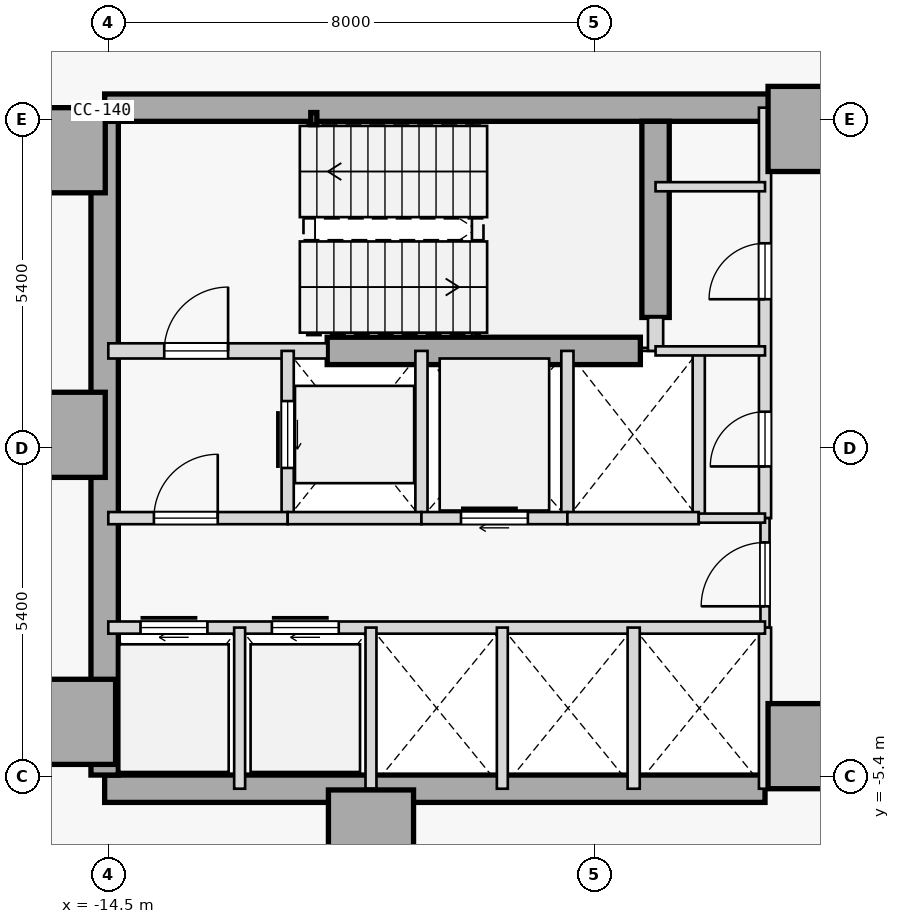
"""IFC4 building model, lengths in metres.
Left out: names, types, materials, properties, quantities, classifications, styles, units other than length and angle.
Written with IfcOpenShell. Run it as: python <this file> out.ifc"""

import sys

from ifc_helpers import new_model, si_unit, direction, frame, frame_2d, origin, origin_2d, place, context, subcontext, project, spatial, rectangle, hollow_rectangle, extrude, element, fill, save


model = new_model("IFC4")
c1 = context("Model", 3, precision=1e-05, world=origin(), true_north=direction((0.0, 1.0)))
c2 = subcontext(c1, "Body", "Model", "MODEL_VIEW")
j1 = project(units=[si_unit("LENGTHUNIT", "METRE"), si_unit("PLANEANGLEUNIT", "RADIAN")], contexts=[c1])
p1 = place(None, origin())
s1 = spatial("IfcSite", under=j1, at=p1, CompositionType="ELEMENT")
p2 = place(p1, origin())
s2 = spatial("IfcBuilding", under=s1, at=p2, CompositionType="ELEMENT")
p3 = place(p2, frame((0.0, 0.0, 75.0)))
s3 = spatial("IfcBuildingStorey", under=s2, at=p3, CompositionType="ELEMENT", Elevation=75.0)
for number, where, z_axis, x_axis in (
    (1, (-15.25, 4.9, 0.0), (0.0, 0.0, 1.0), (1.0, 0.0, 0.0)),
    (2, (-15.25, 0.22, 0.0), (0.0, 0.0, 1.0), (1.0, 0.0, 0.0)),
    (3, (-15.08, -4.5, 0.0), (0.0, 0.0, 1.0), (1.0, 0.0, 0.0)),
    (4, (-10.18, -6.32, 0.0), (0.0, 0.0, 1.0), (1.0, 0.0, 0.0)),
    (5, (-2.95, -4.9, 0.0), (0.0, 0.0, 1.0), (1.0, 0.0, 0.0)),
    (6, (-2.95, 5.25, 0.0), (0.0, 0.0, 1.0), (1.0, 0.0, 0.0)),
):
    element("IfcColumn", number, at=place(p3, frame(where, z_axis=z_axis, x_axis=x_axis)), inside=s3, PredefinedType="COLUMN", context=c2, shape_type="SweptSolid", body=[
        extrude(rectangle(XDim=1.4, YDim=1.4, at=origin_2d()), origin(), (0.0, 0.0, 1.0), 3.8),
    ])
p4 = place(p3, frame((-14.56, 5.6, 0.0), z_axis=(0.0, 0.0, 1.0), x_axis=(1.0, 0.0, 0.0)))
e7 = element("IfcWall", 7, at=p4, inside=s3, PredefinedType="SHEAR", context=c2, shape_type="SweptSolid", body=[
    extrude(rectangle(XDim=11.41, YDim=0.45, at=frame_2d((5.705, 0.0))), origin(), (0.0, 0.0, 1.0), 3.4),
])
p5 = place(p3, frame((-14.56, -5.6, 0.0), z_axis=(0.0, 0.0, 1.0), x_axis=(1.0, 0.0, 0.0)))
e8 = element("IfcWall", 8, at=p5, inside=s3, PredefinedType="SHEAR", context=c2, shape_type="SweptSolid", body=[
    extrude(rectangle(XDim=10.86, YDim=0.45, at=frame_2d((5.43, 0.0))), origin(), (0.0, 0.0, 1.0), 3.4),
])
p6 = place(p3, frame((-14.56, -5.375, 0.0), z_axis=(0.0, 0.0, 1.0), x_axis=(0.0, 1.0, 0.0)))
e9 = element("IfcWall", 9, at=p6, inside=s3, PredefinedType="SHEAR", context=c2, shape_type="SweptSolid", body=[
    extrude(rectangle(XDim=10.75, YDim=0.45, at=frame_2d((5.375, 0.0))), origin(), (0.0, 0.0, 1.0), 3.4),
])
p7 = place(p3, frame((-5.5, 2.15, 0.0), z_axis=(0.0, 0.0, 1.0), x_axis=(0.0, 1.0, 0.0)))
e10 = element("IfcWall", 10, at=p7, inside=s3, PredefinedType="SHEAR", context=c2, shape_type="SweptSolid", body=[
    extrude(rectangle(XDim=3.225, YDim=0.45, at=frame_2d((1.613, 0.0))), origin(), (0.0, 0.0, 1.0), 3.4),
])
p8 = place(p3, frame((-10.9, 1.6, 0.0), z_axis=(0.0, 0.0, 1.0), x_axis=(1.0, 0.0, 0.0)))
e11 = element("IfcWall", 11, at=p8, inside=s3, PredefinedType="SHEAR", context=c2, shape_type="SweptSolid", body=[
    extrude(rectangle(XDim=5.15, YDim=0.45, at=frame_2d((2.575, 0.0))), origin(), (0.0, 0.0, 1.0), 3.4),
])
p9 = place(p3, frame((-11.12, 5.42, 0.0), z_axis=(0.0, 0.0, 1.0), x_axis=(1.0, 0.0, 0.0)))
e12 = element("IfcColumn", 12, at=p9, inside=s3, PredefinedType="COLUMN", context=c2, shape_type="SweptSolid", body=[
    extrude(hollow_rectangle(XDim=0.1, YDim=0.2, WallThickness=0.008, at=origin_2d()), origin(), (0.0, 0.0, 1.0), 3.8),
])
p10 = place(p3, frame((-14.5, 1.6, 0.0), z_axis=(0.0, 0.0, 1.0), x_axis=(1.0, 0.0, 0.0)))
e13 = element("IfcWall", 13, at=p10, inside=s3, PredefinedType="STANDARD", context=c2, shape_type="SweptSolid", body=[
    extrude(rectangle(XDim=3.6, YDim=0.25, at=frame_2d((1.8, 0.0))), origin(), (0.0, 0.0, 1.0), 3.4),
])
p11 = place(p10, frame((0.92, 0.0, 0.0)))
e14 = element("IfcOpeningElement", 14, at=p11, cuts=e13, PredefinedType="OPENING", context=c2, shape_type="SweptSolid", body=[
    extrude(rectangle(XDim=1.05, YDim=2.15, at=frame_2d((0.525, 1.075))), frame((0.0, 0.135, 0.0), z_axis=(0.0, -1.0, 0.0), x_axis=(1.0, 0.0, 0.0)), (0.0, 0.0, 1.0), 0.27),
])
p12 = place(p3, frame((-5.5, 1.6, 0.0), z_axis=(0.0, 0.0, 1.0), x_axis=(0.0, 1.0, 0.0)))
e15 = element("IfcWall", 15, at=p12, inside=s3, PredefinedType="STANDARD", context=c2, shape_type="SweptSolid", body=[
    extrude(rectangle(XDim=0.55, YDim=0.25, at=frame_2d((0.275, 0.0))), origin(), (0.0, 0.0, 1.0), 3.4),
])
p13 = place(p3, frame((-3.7, -1.15, 0.0), z_axis=(0.0, 0.0, 1.0), x_axis=(0.0, 1.0, 0.0)))
e16 = element("IfcWall", 16, at=p13, inside=s3, PredefinedType="STANDARD", context=c2, shape_type="SweptSolid", body=[
    extrude(rectangle(XDim=6.75, YDim=0.2, at=frame_2d((3.375, 0.0))), origin(), (0.0, 0.0, 1.0), 3.4),
])
p14 = place(p13, frame((3.6, 0.0, 0.0)))
e17 = element("IfcOpeningElement", 17, at=p14, cuts=e16, PredefinedType="OPENING", context=c2, shape_type="SweptSolid", body=[
    extrude(rectangle(XDim=0.92, YDim=2.15, at=frame_2d((0.46, 1.075))), frame((0.0, 0.11, 0.0), z_axis=(0.0, -1.0, 0.0), x_axis=(1.0, 0.0, 0.0)), (0.0, 0.0, 1.0), 0.22),
])
p15 = place(p13, frame((0.85, 0.0, 0.0)))
e18 = element("IfcOpeningElement", 18, at=p15, cuts=e16, PredefinedType="OPENING", context=c2, shape_type="SweptSolid", body=[
    extrude(rectangle(XDim=0.9, YDim=2.15, at=frame_2d((0.45, 1.075))), frame((0.0, 0.11, 0.0), z_axis=(0.0, -1.0, 0.0), x_axis=(1.0, 0.0, 0.0)), (0.0, 0.0, 1.0), 0.22),
])
p16 = place(p3, frame((-3.7, -2.95, 0.0), z_axis=(0.0, 0.0, 1.0), x_axis=(0.0, 1.0, 0.0)))
e19 = element("IfcWall", 19, at=p16, inside=s3, PredefinedType="PARTITIONING", context=c2, shape_type="SweptSolid", body=[
    extrude(rectangle(XDim=1.8, YDim=0.15, at=frame_2d((0.9, 0.0))), origin(), (0.0, 0.0, 1.0), 3.4),
])
p17 = place(p16, frame((0.35, 0.0, 0.0)))
e20 = element("IfcOpeningElement", 20, at=p17, cuts=e19, PredefinedType="OPENING", context=c2, shape_type="SweptSolid", body=[
    extrude(rectangle(XDim=1.05, YDim=2.18, at=frame_2d((0.525, 1.09))), frame((0.0, 0.085, 0.0), z_axis=(0.0, -1.0, 0.0), x_axis=(1.0, 0.0, 0.0)), (0.0, 0.0, 1.0), 0.17),
])
p18 = place(p3, frame((-3.7, -5.6, 0.0), z_axis=(0.0, 0.0, 1.0), x_axis=(0.0, 1.0, 0.0)))
e21 = element("IfcWall", 21, at=p18, inside=s3, PredefinedType="STANDARD", context=c2, shape_type="SweptSolid", body=[
    extrude(rectangle(XDim=2.65, YDim=0.2, at=frame_2d((1.325, 0.0))), origin(), (0.0, 0.0, 1.0), 3.4),
])
p19 = place(p3, frame((-11.55, -1.15, 0.0), z_axis=(0.0, 0.0, 1.0), x_axis=(0.0, 1.0, 0.0)))
e22 = element("IfcWall", 22, at=p19, inside=s3, PredefinedType="STANDARD", context=c2, shape_type="SweptSolid", body=[
    extrude(rectangle(XDim=2.75, YDim=0.2, at=frame_2d((1.375, 0.0))), origin(), (0.0, 0.0, 1.0), 3.4),
])
p20 = place(p19, frame((0.825, 0.0, 0.0)))
e23 = element("IfcOpeningElement", 23, at=p20, cuts=e22, PredefinedType="OPENING", context=c2, shape_type="SweptSolid", body=[
    extrude(rectangle(XDim=1.1, YDim=2.15, at=frame_2d((0.55, 1.075))), frame((0.0, 0.11, 0.0), z_axis=(0.0, -1.0, 0.0), x_axis=(1.0, 0.0, 0.0)), (0.0, 0.0, 1.0), 0.22),
])
p21 = place(p3, frame((-9.35, -1.15, 0.0), z_axis=(0.0, 0.0, 1.0), x_axis=(0.0, 1.0, 0.0)))
e24 = element("IfcWall", 24, at=p21, inside=s3, PredefinedType="STANDARD", context=c2, shape_type="SweptSolid", body=[
    extrude(rectangle(XDim=2.75, YDim=0.2, at=frame_2d((1.375, 0.0))), origin(), (0.0, 0.0, 1.0), 3.4),
])
p22 = place(p3, frame((-14.5, -1.15, 0.0), z_axis=(0.0, 0.0, 1.0), x_axis=(1.0, 0.0, 0.0)))
e25 = element("IfcWall", 25, at=p22, inside=s3, PredefinedType="STANDARD", context=c2, shape_type="SweptSolid", body=[
    extrude(rectangle(XDim=2.95, YDim=0.2, at=frame_2d((1.475, 0.0))), origin(), (0.0, 0.0, 1.0), 3.4),
])
p23 = place(p22, frame((0.75, 0.0, 0.0)))
e26 = element("IfcOpeningElement", 26, at=p23, cuts=e25, PredefinedType="OPENING", context=c2, shape_type="SweptSolid", body=[
    extrude(rectangle(XDim=1.05, YDim=2.18, at=frame_2d((0.525, 1.09))), frame((0.0, 0.11, 0.0), z_axis=(0.0, -1.0, 0.0), x_axis=(1.0, 0.0, 0.0)), (0.0, 0.0, 1.0), 0.22),
])
p24 = place(p3, frame((-11.55, -1.15, 0.0), z_axis=(0.0, 0.0, 1.0), x_axis=(1.0, 0.0, 0.0)))
e27 = element("IfcWall", 27, at=p24, inside=s3, PredefinedType="STANDARD", context=c2, shape_type="SweptSolid", body=[
    extrude(rectangle(XDim=2.2, YDim=0.2, at=frame_2d((1.1, 0.0))), origin(), (0.0, 0.0, 1.0), 3.4),
])
p25 = place(p3, frame((-6.95, -1.15, 0.0), z_axis=(0.0, 0.0, 1.0), x_axis=(0.0, 1.0, 0.0)))
e28 = element("IfcWall", 28, at=p25, inside=s3, PredefinedType="STANDARD", context=c2, shape_type="SweptSolid", body=[
    extrude(rectangle(XDim=2.75, YDim=0.2, at=frame_2d((1.375, 0.0))), origin(), (0.0, 0.0, 1.0), 3.4),
])
p26 = place(p3, frame((-9.35, -1.15, 0.0), z_axis=(0.0, 0.0, 1.0), x_axis=(1.0, 0.0, 0.0)))
e29 = element("IfcWall", 29, at=p26, inside=s3, PredefinedType="STANDARD", context=c2, shape_type="SweptSolid", body=[
    extrude(rectangle(XDim=2.4, YDim=0.2, at=frame_2d((1.2, 0.0))), origin(), (0.0, 0.0, 1.0), 3.4),
])
p27 = place(p26, frame((0.65, 0.0, 0.0)))
e30 = element("IfcOpeningElement", 30, at=p27, cuts=e29, PredefinedType="OPENING", context=c2, shape_type="SweptSolid", body=[
    extrude(rectangle(XDim=1.1, YDim=2.15, at=frame_2d((0.55, 1.075))), frame((0.0, 0.11, 0.0), z_axis=(0.0, -1.0, 0.0), x_axis=(1.0, 0.0, 0.0)), (0.0, 0.0, 1.0), 0.22),
])
p28 = place(p3, frame((-4.79, -1.15, 0.0), z_axis=(0.0, 0.0, 1.0), x_axis=(0.0, 1.0, 0.0)))
e31 = element("IfcWall", 31, at=p28, inside=s3, PredefinedType="STANDARD", context=c2, shape_type="SweptSolid", body=[
    extrude(rectangle(XDim=2.75, YDim=0.2, at=frame_2d((1.375, 0.0))), origin(), (0.0, 0.0, 1.0), 3.4),
])
p29 = place(p3, frame((-6.95, -1.15, 0.0), z_axis=(0.0, 0.0, 1.0), x_axis=(1.0, 0.0, 0.0)))
e32 = element("IfcWall", 32, at=p29, inside=s3, PredefinedType="STANDARD", context=c2, shape_type="SweptSolid", body=[
    extrude(rectangle(XDim=2.16, YDim=0.2, at=frame_2d((1.08, 0.0))), origin(), (0.0, 0.0, 1.0), 3.4),
])
p30 = place(p3, frame((-4.79, -1.15, 0.0), z_axis=(0.0, 0.0, 1.0), x_axis=(1.0, 0.0, 0.0)))
e33 = element("IfcWall", 33, at=p30, inside=s3, PredefinedType="PARTITIONING", context=c2, shape_type="SweptSolid", body=[
    extrude(rectangle(XDim=1.09, YDim=0.15, at=frame_2d((0.545, 0.0))), origin(), (0.0, 0.0, 1.0), 3.4),
])
p31 = place(p3, frame((-14.5, -2.95, 0.0), z_axis=(0.0, 0.0, 1.0), x_axis=(1.0, 0.0, 0.0)))
e34 = element("IfcWall", 34, at=p31, inside=s3, PredefinedType="STANDARD", context=c2, shape_type="SweptSolid", body=[
    extrude(rectangle(XDim=10.8, YDim=0.2, at=frame_2d((5.4, 0.0))), origin(), (0.0, 0.0, 1.0), 3.4),
])
p32 = place(p31, frame((0.53, 0.0, 0.0)))
e35 = element("IfcOpeningElement", 35, at=p32, cuts=e34, PredefinedType="OPENING", context=c2, shape_type="SweptSolid", body=[
    extrude(rectangle(XDim=1.1, YDim=2.15, at=frame_2d((0.55, 1.075))), frame((0.0, 0.11, 0.0), z_axis=(0.0, -1.0, 0.0), x_axis=(1.0, 0.0, 0.0)), (0.0, 0.0, 1.0), 0.22),
])
p33 = place(p31, frame((2.69, 0.0, 0.0)))
e36 = element("IfcOpeningElement", 36, at=p33, cuts=e34, PredefinedType="OPENING", context=c2, shape_type="SweptSolid", body=[
    extrude(rectangle(XDim=1.1, YDim=2.15, at=frame_2d((0.55, 1.075))), frame((0.0, 0.11, 0.0), z_axis=(0.0, -1.0, 0.0), x_axis=(1.0, 0.0, 0.0)), (0.0, 0.0, 1.0), 0.22),
])
p34 = place(p3, frame((-5.86, -5.6, 0.0), z_axis=(0.0, 0.0, 1.0), x_axis=(0.0, 1.0, 0.0)))
e37 = element("IfcWall", 37, at=p34, inside=s3, PredefinedType="STANDARD", context=c2, shape_type="SweptSolid", body=[
    extrude(rectangle(XDim=2.65, YDim=0.2, at=frame_2d((1.325, 0.0))), origin(), (0.0, 0.0, 1.0), 3.4),
])
for number, where, z_axis, x_axis in (
    (38, (-12.34, -5.6, 0.0), (0.0, 0.0, 1.0), (0.0, 1.0, 0.0)),
    (39, (-10.18, -5.6, 0.0), (0.0, 0.0, 1.0), (0.0, 1.0, 0.0)),
    (40, (-8.02, -5.6, 0.0), (0.0, 0.0, 1.0), (0.0, 1.0, 0.0)),
):
    element("IfcWall", number, at=place(p3, frame(where, z_axis=z_axis, x_axis=x_axis)), inside=s3, PredefinedType="STANDARD", context=c2, shape_type="SweptSolid", body=[
        extrude(rectangle(XDim=2.65, YDim=0.18, at=frame_2d((1.325, 0.0))), origin(), (0.0, 0.0, 1.0), 3.4),
    ])
for number, where, z_axis, x_axis in (
    (41, (-5.5, 4.3, 0.0), (0.0, 0.0, 1.0), (1.0, 0.0, 0.0)),
    (42, (-5.5, 1.6, 0.0), (0.0, 0.0, 1.0), (1.0, 0.0, 0.0)),
):
    element("IfcWall", number, at=place(p3, frame(where, z_axis=z_axis, x_axis=x_axis)), inside=s3, PredefinedType="PARTITIONING", context=c2, shape_type="SweptSolid", body=[
        extrude(rectangle(XDim=1.8, YDim=0.15, at=frame_2d((0.9, 0.0))), origin(), (0.0, 0.0, 1.0), 3.4),
    ])
p35 = place(p11, origin())
e43 = element("IfcDoor", 43, at=p35, inside=s3, OperationType="SINGLE_SWING_RIGHT", PredefinedType="DOOR", context=c2, shape_type="SweptSolid", body=[
    extrude(rectangle(XDim=1.05, YDim=2.15, at=frame_2d((0.525, 1.075))), frame((0.0, 0.025, 0.0), z_axis=(0.0, -1.0, 0.0), x_axis=(1.0, 0.0, 0.0)), (0.0, 0.0, 1.0), 0.05),
])
fill(e14, e43)
p36 = place(p23, origin())
e44 = element("IfcDoor", 44, at=p36, inside=s3, OperationType="SINGLE_SWING_RIGHT", PredefinedType="DOOR", context=c2, shape_type="SweptSolid", body=[
    extrude(rectangle(XDim=1.05, YDim=2.18, at=frame_2d((0.525, 1.09))), frame((0.0, 0.025, 0.0), z_axis=(0.0, -1.0, 0.0), x_axis=(1.0, 0.0, 0.0)), (0.0, 0.0, 1.0), 0.05),
])
fill(e26, e44)
p37 = place(p17, origin())
e45 = element("IfcDoor", 45, at=p37, inside=s3, OperationType="SINGLE_SWING_LEFT", PredefinedType="DOOR", context=c2, shape_type="SweptSolid", body=[
    extrude(rectangle(XDim=1.05, YDim=2.18, at=frame_2d((0.525, 1.09))), frame((0.0, 0.025, 0.0), z_axis=(0.0, -1.0, 0.0), x_axis=(1.0, 0.0, 0.0)), (0.0, 0.0, 1.0), 0.05),
])
fill(e20, e45)
p38 = place(p20, origin())
e46 = element("IfcDoor", 46, at=p38, inside=s3, OperationType="SLIDING_TO_RIGHT", PredefinedType="DOOR", context=c2, shape_type="SweptSolid", body=[
    extrude(rectangle(XDim=1.1, YDim=2.15, at=frame_2d((0.55, 1.075))), frame((0.0, 0.025, 0.0), z_axis=(0.0, -1.0, 0.0), x_axis=(1.0, 0.0, 0.0)), (0.0, 0.0, 1.0), 0.05),
])
fill(e23, e46)
p39 = place(p27, origin())
e47 = element("IfcDoor", 47, at=p39, inside=s3, OperationType="SLIDING_TO_RIGHT", PredefinedType="DOOR", context=c2, shape_type="SweptSolid", body=[
    extrude(rectangle(XDim=1.1, YDim=2.15, at=frame_2d((0.55, 1.075))), frame((0.0, 0.025, 0.0), z_axis=(0.0, -1.0, 0.0), x_axis=(1.0, 0.0, 0.0)), (0.0, 0.0, 1.0), 0.05),
])
fill(e30, e47)
p40 = place(p32, origin())
e48 = element("IfcDoor", 48, at=p40, inside=s3, OperationType="SLIDING_TO_RIGHT", PredefinedType="DOOR", context=c2, shape_type="SweptSolid", body=[
    extrude(rectangle(XDim=1.1, YDim=2.15, at=frame_2d((0.55, 1.075))), frame((0.0, 0.025, 0.0), z_axis=(0.0, -1.0, 0.0), x_axis=(1.0, 0.0, 0.0)), (0.0, 0.0, 1.0), 0.05),
])
fill(e35, e48)
p41 = place(p33, origin())
e49 = element("IfcDoor", 49, at=p41, inside=s3, OperationType="SLIDING_TO_RIGHT", PredefinedType="DOOR", context=c2, shape_type="SweptSolid", body=[
    extrude(rectangle(XDim=1.1, YDim=2.15, at=frame_2d((0.55, 1.075))), frame((0.0, 0.025, 0.0), z_axis=(0.0, -1.0, 0.0), x_axis=(1.0, 0.0, 0.0)), (0.0, 0.0, 1.0), 0.05),
])
fill(e36, e49)
p42 = place(p14, origin())
e50 = element("IfcDoor", 50, at=p42, inside=s3, OperationType="SINGLE_SWING_LEFT", PredefinedType="DOOR", context=c2, shape_type="SweptSolid", body=[
    extrude(rectangle(XDim=0.92, YDim=2.15, at=frame_2d((0.46, 1.075))), frame((0.0, 0.025, 0.0), z_axis=(0.0, -1.0, 0.0), x_axis=(1.0, 0.0, 0.0)), (0.0, 0.0, 1.0), 0.05),
])
fill(e17, e50)
p43 = place(p15, origin())
e51 = element("IfcDoor", 51, at=p43, inside=s3, OperationType="SINGLE_SWING_LEFT", PredefinedType="DOOR", context=c2, shape_type="SweptSolid", body=[
    extrude(rectangle(XDim=0.9, YDim=2.15, at=frame_2d((0.45, 1.075))), frame((0.0, 0.025, 0.0), z_axis=(0.0, -1.0, 0.0), x_axis=(1.0, 0.0, 0.0)), (0.0, 0.0, 1.0), 0.05),
])
fill(e18, e51)
save(model, sys.argv[1])
